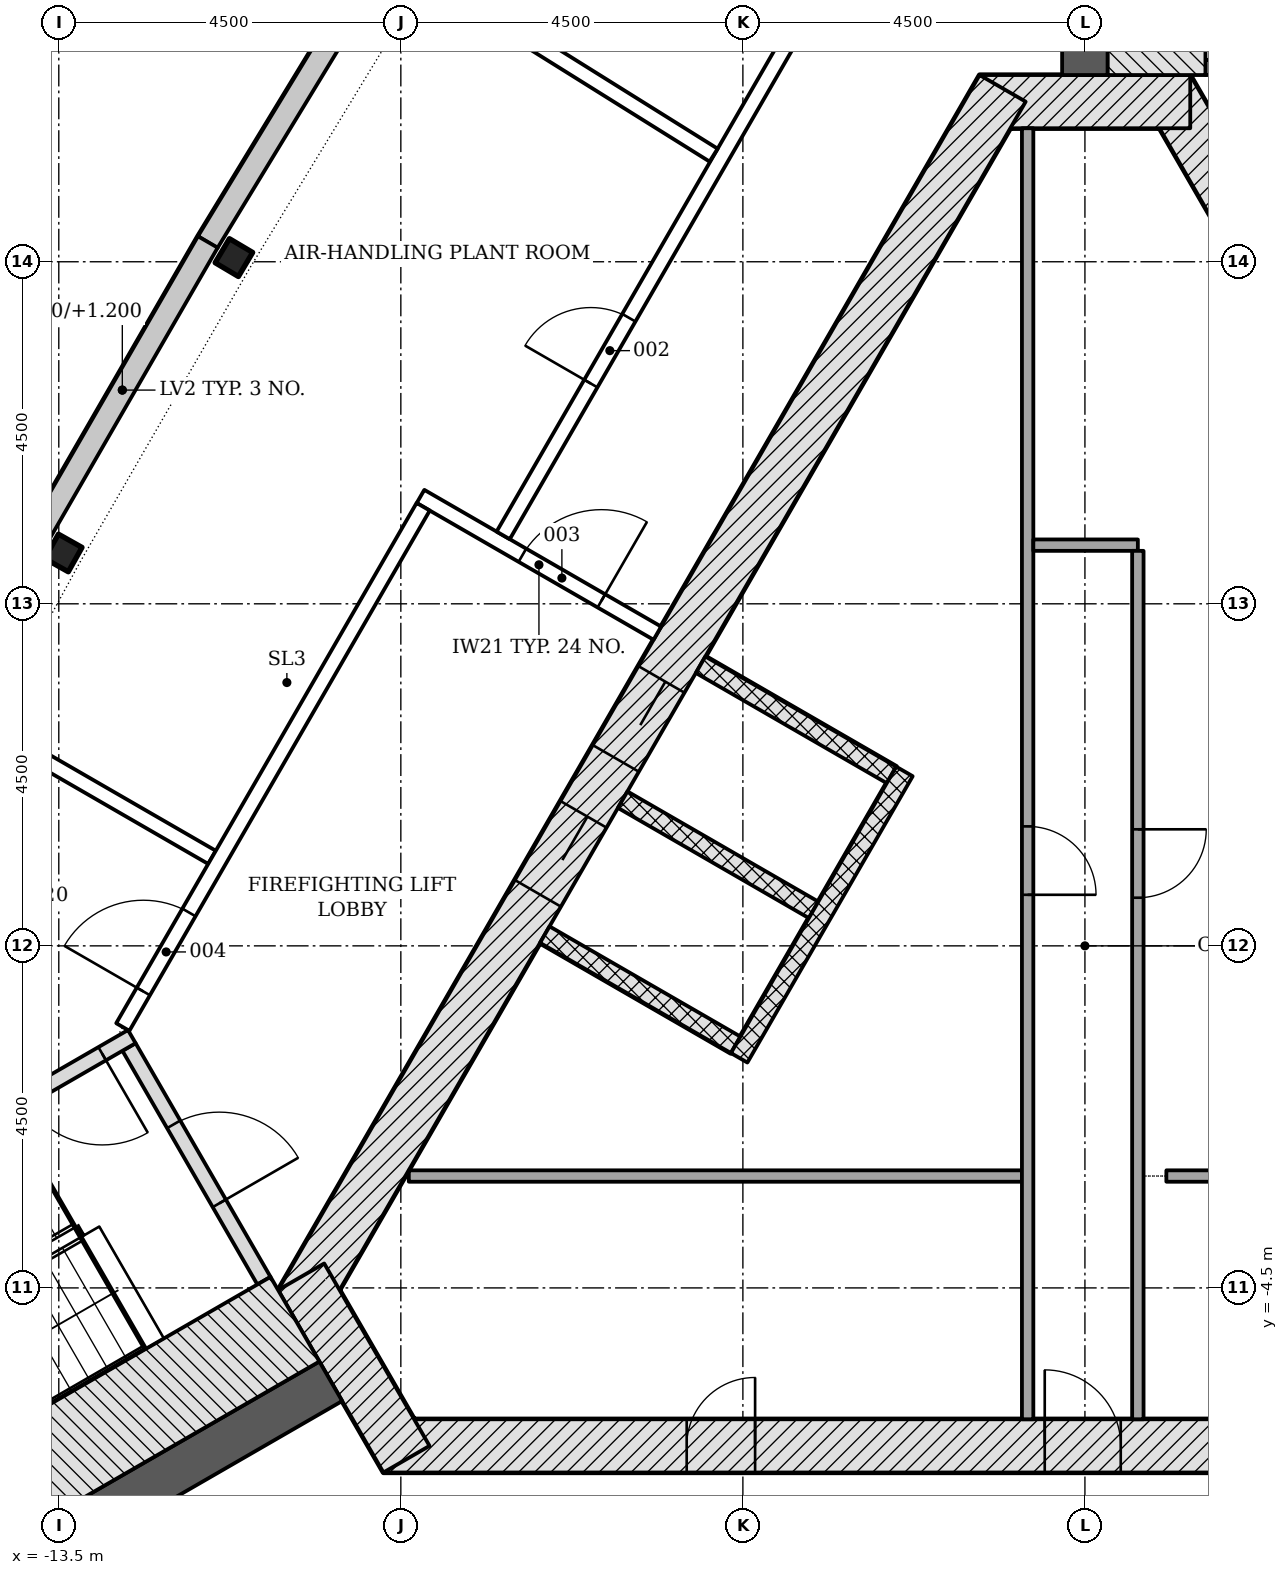
"""IFC4 building model, lengths in metres.
Left out: names, types, materials, properties, quantities, classifications, styles, units other than length and angle.
Written with IfcOpenShell. Run it as: python <this file> out.ifc"""

import sys

from ifc_helpers import new_model, si_unit, direction, frame, frame_2d, origin, origin_2d, place, context, subcontext, project, spatial, polyline, rectangle, i_section, outline, extrude, element, fill, save


model = new_model("IFC4")
c1 = context("Model", 3, precision=1e-05, world=origin(), true_north=direction((0.0, 1.0)))
c2 = subcontext(c1, "Body", "Model", "MODEL_VIEW")
j1 = project(units=[si_unit("LENGTHUNIT", "METRE"), si_unit("PLANEANGLEUNIT", "RADIAN")], contexts=[c1])
p1 = place(None, origin())
s1 = spatial("IfcSite", under=j1, at=p1, CompositionType="ELEMENT")
p2 = place(p1, origin())
s2 = spatial("IfcBuilding", under=s1, at=p2, CompositionType="ELEMENT")
p3 = place(p2, frame((0.0, 0.0, 284.1)))
s3 = spatial("IfcBuildingStorey", under=s2, at=p3, CompositionType="ELEMENT", Elevation=284.1)
p4 = place(p3, frame((-9.229, -6.578, -0.25), z_axis=(0.0, 0.0, 1.0), x_axis=(1.0, 0.0, 0.0)))
e1 = element("IfcWall", 1, at=p4, inside=s3, PredefinedType="SHEAR", context=c2, shape_type="SweptSolid", body=[
    extrude(rectangle(XDim=18.458, YDim=0.7, at=frame_2d((9.229, 0.0))), origin(), (0.0, 0.0, 1.0), 4.5),
])
p5 = place(p4, frame((8.7, 0.0, 0.25)))
e2 = element("IfcOpeningElement", 2, at=p5, cuts=e1, PredefinedType="OPENING", context=c2, shape_type="SweptSolid", body=[
    extrude(rectangle(XDim=1.0, YDim=2.1, at=frame_2d((0.5, 1.05))), frame((0.0, 0.36, 0.0), z_axis=(0.0, -1.0, 0.0), x_axis=(1.0, 0.0, 0.0)), (0.0, 0.0, 1.0), 0.72),
])
p6 = place(p4, frame((3.99, 0.0, 0.25)))
e3 = element("IfcOpeningElement", 3, at=p6, cuts=e1, PredefinedType="OPENING", context=c2, shape_type="SweptSolid", body=[
    extrude(rectangle(XDim=0.9, YDim=2.1, at=frame_2d((0.45, 1.05))), frame((0.0, 0.36, 0.0), z_axis=(0.0, -1.0, 0.0), x_axis=(1.0, 0.0, 0.0)), (0.0, 0.0, 1.0), 0.72),
])
p7 = place(p4, frame((13.539, 0.0, 0.25)))
e4 = element("IfcOpeningElement", 4, at=p7, cuts=e1, PredefinedType="OPENING", context=c2, shape_type="SweptSolid", body=[
    extrude(rectangle(XDim=0.9, YDim=2.1, at=frame_2d((0.45, 1.05))), frame((0.0, 0.36, 0.0), z_axis=(0.0, -1.0, 0.0), x_axis=(1.0, 0.0, 0.0)), (0.0, 0.0, 1.0), 0.72),
])
p8 = place(p3, frame((10.311, -4.703, -0.25), z_axis=(0.0, 0.0, 1.0), x_axis=(-0.500001446645, 0.866024568562, 0.0)))
e5 = element("IfcWall", 5, at=p8, inside=s3, PredefinedType="SHEAR", context=c2, shape_type="SweptSolid", body=[
    extrude(rectangle(XDim=18.458, YDim=0.7, at=frame_2d((9.229, 0.0))), origin(), (0.0, 0.0, 1.0), 4.5),
])
p9 = place(p3, frame((1.386, 11.106, -0.25), z_axis=(0.0, 0.0, 1.0), x_axis=(-1.0, 0.0, 0.0)))
e6 = element("IfcWall", 6, at=p9, inside=s3, PredefinedType="SHEAR", context=c2, shape_type="SweptSolid", body=[
    extrude(rectangle(XDim=2.771, YDim=0.7, at=frame_2d((1.386, 0.0))), origin(), (0.0, 0.0, 1.0), 4.5),
])
p10 = place(p3, frame((-1.083, 11.281, -0.25), z_axis=(0.0, 0.0, 1.0), x_axis=(-0.500001446645, -0.866024568562, 0.0)))
e7 = element("IfcWall", 7, at=p10, inside=s3, PredefinedType="SHEAR", context=c2, shape_type="SweptSolid", body=[
    extrude(rectangle(XDim=18.458, YDim=0.7, at=frame_2d((9.229, 0.0))), origin(), (0.0, 0.0, 1.0), 4.5),
])
p11 = place(p10, frame((8.979, 0.0, 0.25)))
e8 = element("IfcOpeningElement", 8, at=p11, cuts=e7, PredefinedType="OPENING", context=c2, shape_type="SweptSolid", body=[
    extrude(rectangle(XDim=1.2, YDim=2.1, at=frame_2d((0.6, 1.05))), frame((0.0, 0.36, 0.0), z_axis=(0.0, -1.0, 0.0), x_axis=(1.0, 0.0, 0.0)), (0.0, 0.0, 1.0), 0.72),
])
p12 = place(p10, frame((11.029, 0.0, 0.25)))
e9 = element("IfcOpeningElement", 9, at=p12, cuts=e7, PredefinedType="OPENING", context=c2, shape_type="SweptSolid", body=[
    extrude(rectangle(XDim=1.2, YDim=2.1, at=frame_2d((0.6, 1.05))), frame((0.0, 0.36, 0.0), z_axis=(0.0, -1.0, 0.0), x_axis=(1.0, 0.0, 0.0)), (0.0, 0.0, 1.0), 0.72),
])
p13 = place(p3, frame((-10.311, -4.353, -0.25), z_axis=(0.0, 0.0, 1.0), x_axis=(0.500042739161, -0.866000726912, 0.0)))
e10 = element("IfcWall", 10, at=p13, inside=s3, PredefinedType="SHEAR", context=c2, shape_type="SweptSolid", body=[
    extrude(rectangle(XDim=2.771, YDim=0.7, at=frame_2d((1.386, 0.0))), origin(), (0.0, 0.0, 1.0), 4.5),
])
p14 = place(p3, frame((0.0, 11.456, -0.25), z_axis=(0.0, 0.0, 1.0), x_axis=(0.0, 1.0, 0.0)))
e11 = element("IfcWall", 11, at=p14, inside=s3, PredefinedType="SHEAR", context=c2, shape_type="SweptSolid", body=[
    extrude(rectangle(XDim=6.679, YDim=0.6, at=frame_2d((3.339, 0.0))), origin(), (0.0, 0.0, 1.0), 4.5),
])
p15 = place(p3, frame((-9.922, -5.728, -0.25), z_axis=(0.0, 0.0, 1.0), x_axis=(-0.866032176823, -0.499988268569, 0.0)))
e12 = element("IfcWall", 12, at=p15, inside=s3, PredefinedType="SHEAR", context=c2, shape_type="SweptSolid", body=[
    extrude(rectangle(XDim=6.678, YDim=0.6, at=frame_2d((3.339, 0.0))), origin(), (0.0, 0.0, 1.0), 4.5),
])
for number, where, z_axis, x_axis in (
    (13, (-11.196, 9.055, -0.25), (0.0, 0.0, 1.0), (-0.51, -0.86, 0.0)),
    (14, (-13.44, 5.169, -0.25), (0.0, 0.0, 1.0), (-0.49, -0.872, 0.0)),
):
    element("IfcColumn", number, at=place(p3, frame(where, z_axis=z_axis, x_axis=x_axis)), inside=s3, PredefinedType="COLUMN", context=c2, shape_type="SweptSolid", body=[
        extrude(i_section(OverallWidth=0.368, OverallDepth=0.356, WebThickness=0.011, FlangeThickness=0.018, FilletRadius=0.015, at=origin_2d()), origin(), (0.0, 0.0, 1.0), 4.5),
    ])
p16 = place(p3, origin())
e15 = element("IfcWall", 15, at=p16, inside=s3, PredefinedType="NOTDEFINED", context=c2, shape_type="SweptSolid", body=[
    extrude(outline(polyline([(-6.901, 16.968), (-9.33, 13.179), (-11.669, 9.335), (-11.413, 9.179), (-9.075, 13.02), (-6.649, 16.806), (-6.901, 16.968)])), origin(), (0.0, 0.0, 1.0), 4.25),
])
p17 = place(p3, origin())
e16 = element("IfcWall", 16, at=p17, inside=s3, PredefinedType="NOTDEFINED", context=c2, shape_type="SweptSolid", body=[
    extrude(outline(polyline([(-11.669, 9.335), (-13.919, 5.438), (-13.659, 5.288), (-11.409, 9.185), (-11.669, 9.335)])), origin(), (0.0, 0.0, 1.0), 1.2),
])
p18 = place(p3, origin())
e17 = element("IfcWall", 17, at=p18, inside=s3, PredefinedType="NOTDEFINED", context=c2, shape_type="SweptSolid", body=[
    extrude(outline(polyline([(-18.145, -2.507), (-19.021, -4.273), (-19.538, -5.703), (-19.733, -7.21), (-19.599, -8.724), (-19.141, -10.174), (-18.381, -11.49), (-17.355, -12.611), (-16.111, -13.485), (-14.708, -14.069), (-13.211, -14.336), (-11.244, -14.46), (-11.225, -14.161), (-13.176, -14.038), (-14.623, -13.779), (-15.965, -13.22), (-17.156, -12.385), (-18.138, -11.312), (-18.865, -10.052), (-19.303, -8.665), (-19.432, -7.216), (-19.244, -5.774), (-18.745, -4.391), (-17.876, -2.64), (-18.145, -2.507)])), origin(), (0.0, 0.0, 1.0), 4.25),
])
for number, where, z_axis, x_axis in (
    (18, (-5.056, 3.699, -0.25), (0.0, 0.0, 1.0), (0.866, -0.5, 0.0)),
    (19, (-6.081, 1.923, -0.25), (0.0, 0.0, 1.0), (0.866, -0.5, 0.0)),
    (20, (-7.106, 0.148, -0.25), (0.0, 0.0, 1.0), (0.866, -0.5, 0.0)),
):
    element("IfcWall", number, at=place(p3, frame(where, z_axis=z_axis, x_axis=x_axis)), inside=s3, PredefinedType="PARTITIONING", context=c2, shape_type="SweptSolid", body=[
        extrude(rectangle(XDim=2.9, YDim=0.25, at=frame_2d((1.45, 0.0))), origin(), (0.0, 0.0, 1.0), 4.5),
    ])
p19 = place(p3, frame((-2.374, 2.294, 0.0), z_axis=(0.0, 0.0, 1.0), x_axis=(-0.499996127374, -0.866027639635, 0.0)))
e21 = element("IfcWall", 21, at=p19, inside=s3, PredefinedType="PARTITIONING", context=c2, shape_type="SweptSolid", body=[
    extrude(rectangle(XDim=4.35, YDim=0.25, at=frame_2d((2.175, 0.0))), origin(), (0.0, 0.0, 1.0), 4.25),
])
p20 = place(p3, frame((-8.895, -3.028, 0.0), z_axis=(0.0, 0.0, 1.0), x_axis=(1.0, 0.0, 0.0)))
e22 = element("IfcWall", 22, at=p20, inside=s3, PredefinedType="PARTITIONING", context=c2, shape_type="SweptSolid", body=[
    extrude(rectangle(XDim=8.066, YDim=0.15, at=frame_2d((4.033, 0.0))), origin(), (0.0, 0.0, 1.0), 4.25),
])
p21 = place(p3, frame((-0.754, 10.756, 0.0), z_axis=(0.0, 0.0, 1.0), x_axis=(0.0, -1.0, 0.0)))
e23 = element("IfcWall", 23, at=p21, inside=s3, PredefinedType="PARTITIONING", context=c2, shape_type="SweptSolid", body=[
    extrude(rectangle(XDim=16.985, YDim=0.15, at=frame_2d((8.492, 0.0))), origin(), (0.0, 0.0, 1.0), 4.25),
])
p22 = place(p21, frame((9.185, 0.0, 0.0)))
e24 = element("IfcOpeningElement", 24, at=p22, cuts=e23, PredefinedType="OPENING", context=c2, shape_type="SweptSolid", body=[
    extrude(rectangle(XDim=0.9, YDim=2.1, at=frame_2d((0.45, 1.05))), frame((0.0, 0.085, 0.0), z_axis=(0.0, -1.0, 0.0), x_axis=(1.0, 0.0, 0.0)), (0.0, 0.0, 1.0), 0.17),
])
p23 = place(p3, frame((-0.679, 5.272, 0.0), z_axis=(0.0, 0.0, 1.0), x_axis=(1.0, 0.0, 0.0)))
e25 = element("IfcWall", 25, at=p23, inside=s3, PredefinedType="PARTITIONING", context=c2, shape_type="SweptSolid", body=[
    extrude(rectangle(XDim=1.375, YDim=0.15, at=frame_2d((0.688, 0.0))), origin(), (0.0, 0.0, 1.0), 4.25),
])
p24 = place(p3, frame((0.696, 5.197, 0.0), z_axis=(0.0, 0.0, 1.0), x_axis=(0.0, -1.0, 0.0)))
e26 = element("IfcWall", 26, at=p24, inside=s3, PredefinedType="PARTITIONING", context=c2, shape_type="SweptSolid", body=[
    extrude(rectangle(XDim=11.425, YDim=0.15, at=frame_2d((5.712, 0.0))), origin(), (0.0, 0.0, 1.0), 4.25),
])
p25 = place(p24, frame((3.664, 0.0, 0.0)))
e27 = element("IfcOpeningElement", 27, at=p25, cuts=e26, PredefinedType="OPENING", context=c2, shape_type="SweptSolid", body=[
    extrude(rectangle(XDim=0.9, YDim=2.1, at=frame_2d((0.45, 1.05))), frame((0.0, 0.085, 0.0), z_axis=(0.0, -1.0, 0.0), x_axis=(1.0, 0.0, 0.0)), (0.0, 0.0, 1.0), 0.17),
])
p26 = place(p3, frame((1.071, -3.028, 0.0), z_axis=(0.0, 0.0, 1.0), x_axis=(1.0, 0.0, 0.0)))
e28 = element("IfcWall", 28, at=p26, inside=s3, PredefinedType="PARTITIONING", context=c2, shape_type="SweptSolid", body=[
    extrude(rectangle(XDim=7.824, YDim=0.15, at=frame_2d((3.912, 0.0))), origin(), (0.0, 0.0, 1.0), 4.25),
])
p27 = place(p3, frame((5.135, 11.556, -0.25), z_axis=(0.0, 0.0, 1.0), x_axis=(-1.0, 0.0, 0.0)))
e29 = element("IfcWall", 29, at=p27, inside=s3, PredefinedType="SHEAR", context=c2, shape_type="SweptSolid", body=[
    extrude(rectangle(XDim=3.55, YDim=0.2, at=frame_2d((1.775, 0.0))), origin(), (0.0, 0.0, 1.0), 4.5),
])
p28 = place(p27, frame((1.175, 0.0, 0.25)))
e30 = element("IfcOpeningElement", 30, at=p28, cuts=e29, PredefinedType="OPENING", context=c2, shape_type="SweptSolid", body=[
    extrude(rectangle(XDim=1.2, YDim=2.1, at=frame_2d((0.6, 1.05))), frame((0.0, 0.11, 0.0), z_axis=(0.0, -1.0, 0.0), x_axis=(1.0, 0.0, 0.0)), (0.0, 0.0, 1.0), 0.22),
])
p29 = place(p3, frame((0.943, 11.456, -0.25), z_axis=(0.0, 0.0, 1.0), x_axis=(0.0, 1.0, 0.0)))
e31 = element("IfcWall", 31, at=p29, inside=s3, PredefinedType="SHEAR", context=c2, shape_type="SweptSolid", body=[
    extrude(rectangle(XDim=6.679, YDim=1.286, at=frame_2d((3.339, 0.0))), origin(), (0.0, 0.0, 1.0), 4.5),
])
p30 = place(p3, frame((-12.576, -1.331, -0.25), z_axis=(0.0, 0.0, 1.0), x_axis=(0.499970499736, -0.8660424351, 0.0)))
e32 = element("IfcWall", 32, at=p30, inside=s3, PredefinedType="SHEAR", context=c2, shape_type="SweptSolid", body=[
    extrude(rectangle(XDim=3.55, YDim=0.2, at=frame_2d((1.775, 0.0))), origin(), (0.0, 0.0, 1.0), 4.5),
])
p31 = place(p30, frame((1.175, 0.0, 0.25)))
e33 = element("IfcOpeningElement", 33, at=p31, cuts=e32, PredefinedType="OPENING", context=c2, shape_type="SweptSolid", body=[
    extrude(rectangle(XDim=1.2, YDim=2.1, at=frame_2d((0.6, 1.05))), frame((0.0, 0.11, 0.0), z_axis=(0.0, -1.0, 0.0), x_axis=(1.0, 0.0, 0.0)), (0.0, 0.0, 1.0), 0.22),
])
p32 = place(p3, frame((-12.539, -1.194, -0.25), z_axis=(0.0, 0.0, 1.0), x_axis=(-0.866045472092, -0.499965239061, 0.0)))
e34 = element("IfcWall", 34, at=p32, inside=s3, PredefinedType="SHEAR", context=c2, shape_type="SweptSolid", body=[
    extrude(rectangle(XDim=5.6, YDim=0.2, at=frame_2d((2.8, 0.0))), origin(), (0.0, 0.0, 1.0), 4.5),
])
p33 = place(p32, frame((0.45, 0.0, 0.25)))
e35 = element("IfcOpeningElement", 35, at=p33, cuts=e34, PredefinedType="OPENING", context=c2, shape_type="SweptSolid", body=[
    extrude(rectangle(XDim=1.2, YDim=2.1, at=frame_2d((0.6, 1.05))), frame((0.0, 0.11, 0.0), z_axis=(0.0, -1.0, 0.0), x_axis=(1.0, 0.0, 0.0)), (0.0, 0.0, 1.0), 0.22),
])
p34 = place(p3, frame((-10.393, -4.912, -0.25), z_axis=(0.0, 0.0, 1.0), x_axis=(-0.866025486527, -0.499999856685, 0.0)))
e36 = element("IfcWall", 36, at=p34, inside=s3, PredefinedType="SHEAR", context=c2, shape_type="SweptSolid", body=[
    extrude(rectangle(XDim=6.679, YDim=1.286, at=frame_2d((3.339, 0.0))), origin(), (0.0, 0.0, 1.0), 4.5),
])
p35 = place(p3, frame((-8.741, 5.913, 0.0), z_axis=(0.0, 0.0, 1.0), x_axis=(0.866017220491, -0.500014173611, 0.0)))
e37 = element("IfcWall", 37, at=p35, inside=s3, PredefinedType="PARTITIONING", context=c2, shape_type="SweptSolid", body=[
    extrude(rectangle(XDim=3.598, YDim=0.2, at=frame_2d((1.799, 0.0))), origin(), (0.0, 0.0, 1.0), 4.25),
])
p36 = place(p35, frame((1.548, 0.0, 0.0)))
e38 = element("IfcOpeningElement", 38, at=p36, cuts=e37, PredefinedType="OPENING", context=c2, shape_type="SweptSolid", body=[
    extrude(rectangle(XDim=1.2, YDim=2.1, at=frame_2d((0.6, 1.05))), frame((0.0, 0.11, 0.0), z_axis=(0.0, -1.0, 0.0), x_axis=(1.0, 0.0, 0.0)), (0.0, 0.0, 1.0), 0.22),
])
p37 = place(p3, frame((-14.013, 2.625, 0.0), z_axis=(0.0, 0.0, 1.0), x_axis=(0.866026830048, -0.499997529631, 0.0)))
e39 = element("IfcWall", 39, at=p37, inside=s3, PredefinedType="PARTITIONING", context=c2, shape_type="SweptSolid", body=[
    extrude(rectangle(XDim=2.919, YDim=0.2, at=frame_2d((1.46, 0.0))), origin(), (0.0, 0.0, 1.0), 4.25),
])
p38 = place(p3, frame((-12.658, -1.068, 0.0), z_axis=(0.0, 0.0, 1.0), x_axis=(0.499996073327, 0.866027670838, 0.0)))
e40 = element("IfcWall", 40, at=p38, inside=s3, PredefinedType="PARTITIONING", context=c2, shape_type="SweptSolid", body=[
    extrude(rectangle(XDim=7.904, YDim=0.2, at=frame_2d((3.952, 0.0))), origin(), (0.0, 0.0, 1.0), 3.702),
])
p39 = place(p38, frame((0.541, 0.0, 0.0)))
e41 = element("IfcOpeningElement", 41, at=p39, cuts=e40, PredefinedType="OPENING", context=c2, shape_type="SweptSolid", body=[
    extrude(rectangle(XDim=1.2, YDim=2.1, at=frame_2d((0.6, 1.05))), frame((0.0, 0.11, 0.0), z_axis=(0.0, -1.0, 0.0), x_axis=(1.0, 0.0, 0.0)), (0.0, 0.0, 1.0), 0.22),
])
p40 = place(p3, frame((-7.654, 5.4, 0.0), z_axis=(0.0, 0.0, 1.0), x_axis=(0.500007192329, 0.866021251252, 0.0)))
e42 = element("IfcWall", 42, at=p40, inside=s3, PredefinedType="PARTITIONING", context=c2, shape_type="SweptSolid", body=[
    extrude(rectangle(XDim=14.547, YDim=0.2, at=frame_2d((7.273, 0.0))), origin(), (0.0, 0.0, 1.0), 3.702),
])
p41 = place(p40, frame((9.709, 0.0, 0.0)))
e43 = element("IfcOpeningElement", 43, at=p41, cuts=e42, PredefinedType="OPENING", context=c2, shape_type="SweptSolid", body=[
    extrude(rectangle(XDim=1.0, YDim=2.1, at=frame_2d((0.5, 1.05))), frame((0.0, 0.11, 0.0), z_axis=(0.0, -1.0, 0.0), x_axis=(1.0, 0.0, 0.0)), (0.0, 0.0, 1.0), 0.22),
])
p42 = place(p40, frame((2.306, 0.0, 0.0)))
e44 = element("IfcOpeningElement", 44, at=p42, cuts=e42, PredefinedType="OPENING", context=c2, shape_type="SweptSolid", body=[
    extrude(rectangle(XDim=1.0, YDim=2.1, at=frame_2d((0.5, 1.05))), frame((0.0, 0.11, 0.0), z_axis=(0.0, -1.0, 0.0), x_axis=(1.0, 0.0, 0.0)), (0.0, 0.0, 1.0), 0.22),
])
p43 = place(p3, frame((-8.736, 12.808, 0.0), z_axis=(0.0, 0.0, 1.0), x_axis=(0.848122134255, -0.529800760085, 0.0)))
e45 = element("IfcWall", 45, at=p43, inside=s3, PredefinedType="PARTITIONING", context=c2, shape_type="SweptSolid", body=[
    extrude(rectangle(XDim=4.541, YDim=0.2, at=frame_2d((2.27, 0.0))), origin(), (0.0, 0.0, 1.0), 3.702),
])
p44 = place(p11, origin())
e46 = element("IfcDoor", 46, at=p44, inside=s3, OperationType="DOUBLE_DOOR_SLIDING", PredefinedType="DOOR", context=c2, shape_type="SweptSolid", body=[
    extrude(rectangle(XDim=1.2, YDim=2.1, at=frame_2d((0.6, 1.05))), frame((0.0, 0.025, 0.0), z_axis=(0.0, -1.0, 0.0), x_axis=(1.0, 0.0, 0.0)), (0.0, 0.0, 1.0), 0.05),
])
fill(e8, e46)
p45 = place(p12, origin())
e47 = element("IfcDoor", 47, at=p45, inside=s3, OperationType="DOUBLE_DOOR_SLIDING", PredefinedType="DOOR", context=c2, shape_type="SweptSolid", body=[
    extrude(rectangle(XDim=1.2, YDim=2.1, at=frame_2d((0.6, 1.05))), frame((0.0, 0.025, 0.0), z_axis=(0.0, -1.0, 0.0), x_axis=(1.0, 0.0, 0.0)), (0.0, 0.0, 1.0), 0.05),
])
fill(e9, e47)
p46 = place(p5, origin())
e48 = element("IfcDoor", 48, at=p46, inside=s3, OperationType="SINGLE_SWING_LEFT", PredefinedType="DOOR", context=c2, shape_type="SweptSolid", body=[
    extrude(rectangle(XDim=1.0, YDim=2.1, at=frame_2d((0.5, 1.05))), frame((0.0, 0.075, 0.0), z_axis=(0.0, -1.0, 0.0), x_axis=(1.0, 0.0, 0.0)), (0.0, 0.0, 1.0), 0.15),
])
fill(e2, e48)
p47 = place(p6, origin())
e49 = element("IfcDoor", 49, at=p47, inside=s3, OperationType="SINGLE_SWING_RIGHT", PredefinedType="DOOR", context=c2, shape_type="SweptSolid", body=[
    extrude(rectangle(XDim=0.9, YDim=2.1, at=frame_2d((0.45, 1.05))), frame((0.0, 0.075, 0.0), z_axis=(0.0, -1.0, 0.0), x_axis=(1.0, 0.0, 0.0)), (0.0, 0.0, 1.0), 0.15),
])
fill(e3, e49)
p48 = place(p22, origin())
e50 = element("IfcDoor", 50, at=p48, inside=s3, OperationType="SINGLE_SWING_RIGHT", PredefinedType="DOOR", context=c2, shape_type="SweptSolid", body=[
    extrude(rectangle(XDim=0.9, YDim=2.1, at=frame_2d((0.45, 1.05))), frame((0.0, 0.025, 0.0), z_axis=(0.0, -1.0, 0.0), x_axis=(1.0, 0.0, 0.0)), (0.0, 0.0, 1.0), 0.05),
])
fill(e24, e50)
p49 = place(p25, origin())
e51 = element("IfcDoor", 51, at=p49, inside=s3, OperationType="SINGLE_SWING_LEFT", PredefinedType="DOOR", context=c2, shape_type="SweptSolid", body=[
    extrude(rectangle(XDim=0.9, YDim=2.1, at=frame_2d((0.45, 1.05))), frame((0.0, 0.025, 0.0), z_axis=(0.0, -1.0, 0.0), x_axis=(1.0, 0.0, 0.0)), (0.0, 0.0, 1.0), 0.05),
])
fill(e27, e51)
p50 = place(p31, origin())
e52 = element("IfcDoor", 52, at=p50, inside=s3, OperationType="SINGLE_SWING_RIGHT", PredefinedType="DOOR", context=c2, shape_type="SweptSolid", body=[
    extrude(rectangle(XDim=1.2, YDim=2.1, at=frame_2d((0.6, 1.05))), frame((0.0, 0.025, 0.0), z_axis=(0.0, -1.0, 0.0), x_axis=(1.0, 0.0, 0.0)), (0.0, 0.0, 1.0), 0.05),
])
fill(e33, e52)
p51 = place(p33, origin())
e53 = element("IfcDoor", 53, at=p51, inside=s3, OperationType="SINGLE_SWING_LEFT", PredefinedType="DOOR", context=c2, shape_type="SweptSolid", body=[
    extrude(rectangle(XDim=1.2, YDim=2.1, at=frame_2d((0.6, 1.05))), frame((0.0, 0.025, 0.0), z_axis=(0.0, -1.0, 0.0), x_axis=(1.0, 0.0, 0.0)), (0.0, 0.0, 1.0), 0.05),
])
fill(e35, e53)
p52 = place(p42, origin())
e54 = element("IfcDoor", 54, at=p52, inside=s3, OperationType="SINGLE_SWING_LEFT", PredefinedType="DOOR", context=c2, shape_type="SweptSolid", body=[
    extrude(rectangle(XDim=1.0, YDim=2.1, at=frame_2d((0.5, 1.05))), frame((0.0, 0.025, 0.0), z_axis=(0.0, -1.0, 0.0), x_axis=(1.0, 0.0, 0.0)), (0.0, 0.0, 1.0), 0.05),
])
fill(e44, e54)
p53 = place(p36, origin())
e55 = element("IfcDoor", 55, at=p53, inside=s3, OperationType="SINGLE_SWING_RIGHT", PredefinedType="DOOR", context=c2, shape_type="SweptSolid", body=[
    extrude(rectangle(XDim=1.2, YDim=2.1, at=frame_2d((0.6, 1.05))), frame((0.0, 0.025, 0.0), z_axis=(0.0, -1.0, 0.0), x_axis=(1.0, 0.0, 0.0)), (0.0, 0.0, 1.0), 0.05),
])
fill(e38, e55)
p54 = place(p39, origin())
e56 = element("IfcDoor", 56, at=p54, inside=s3, OperationType="SINGLE_SWING_LEFT", PredefinedType="DOOR", context=c2, shape_type="SweptSolid", body=[
    extrude(rectangle(XDim=1.2, YDim=2.1, at=frame_2d((0.6, 1.05))), frame((0.0, 0.025, 0.0), z_axis=(0.0, -1.0, 0.0), x_axis=(1.0, 0.0, 0.0)), (0.0, 0.0, 1.0), 0.05),
])
fill(e41, e56)
save(model, sys.argv[1])
